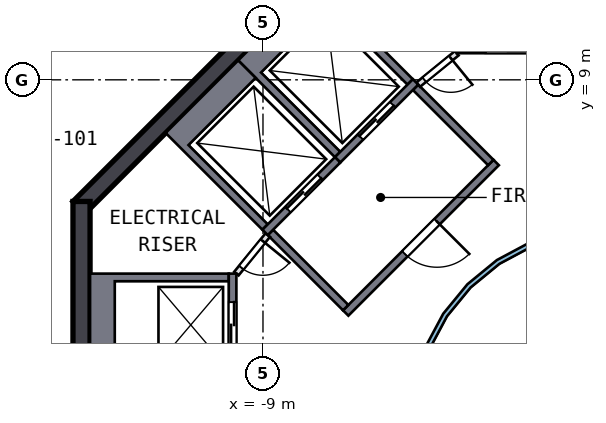
"""IFC4 building model, lengths in metres.
Left out: names, types, materials, properties, quantities, classifications, styles, units other than length and angle.
Written with IfcOpenShell. Run it as: python <this file> out.ifc"""

import sys

from ifc_helpers import new_model, si_unit, direction, frame, frame_2d, origin, place, context, subcontext, project, spatial, polyline, rectangle, outline, extrude, element, fill, save


model = new_model("IFC4")
c1 = context("Model", 3, precision=1e-05, world=origin(), true_north=direction((0.0, 1.0)))
c2 = subcontext(c1, "Body", "Model", "MODEL_VIEW")
j1 = project(units=[si_unit("LENGTHUNIT", "METRE"), si_unit("PLANEANGLEUNIT", "RADIAN")], contexts=[c1])
p1 = place(None, origin())
s1 = spatial("IfcSite", under=j1, at=p1, CompositionType="ELEMENT")
p2 = place(p1, origin())
s2 = spatial("IfcBuilding", under=s1, at=p2, CompositionType="ELEMENT")
p3 = place(p2, frame((0.0, 0.0, 299.5)))
s3 = spatial("IfcBuildingStorey", under=s2, at=p3, CompositionType="ELEMENT", Elevation=299.5)
p4 = place(p3, frame((-5.64, 13.841, 0.0), z_axis=(0.0, 0.0, 1.0), x_axis=(-0.707106781, -0.707106781, 0.0)))
e1 = element("IfcWall", 1, at=p4, inside=s3, PredefinedType="SHEAR", context=c2, shape_type="SweptSolid", body=[
    extrude(rectangle(XDim=11.598, YDim=0.45, at=frame_2d((5.799, 0.0))), origin(), (0.0, 0.0, 1.0), 3.5),
])
p5 = place(p3, frame((-13.775, 5.799, 0.0), z_axis=(0.0, 0.0, 1.0), x_axis=(0.0, -1.0, 0.0)))
e2 = element("IfcWall", 2, at=p5, inside=s3, PredefinedType="SHEAR", context=c2, shape_type="SweptSolid", body=[
    extrude(rectangle(XDim=11.598, YDim=0.45, at=frame_2d((5.799, 0.0))), origin(), (0.0, 0.0, 1.0), 3.5),
])
p6 = place(p5, frame((4.899, 0.0, 0.0)))
e3 = element("IfcOpeningElement", 3, at=p6, cuts=e2, PredefinedType="OPENING", context=c2, shape_type="SweptSolid", body=[
    extrude(rectangle(XDim=1.8, YDim=2.1, at=frame_2d((0.9, 1.05))), frame((0.0, 0.235, 0.0), z_axis=(0.0, -1.0, 0.0), x_axis=(1.0, 0.0, 0.0)), (0.0, 0.0, 1.0), 0.47),
])
p7 = place(p3, frame((-1.2, 9.8, 0.0), z_axis=(0.0, 0.0, 1.0), x_axis=(-1.0, 0.0, 0.0)))
e4 = element("IfcWall", 4, at=p7, inside=s3, PredefinedType="SOLIDWALL", context=c2, shape_type="SweptSolid", body=[
    extrude(rectangle(XDim=2.7, YDim=0.2, at=frame_2d((1.35, 0.0))), origin(), (0.0, 0.0, 1.0), 3.19),
])
p8 = place(p7, frame((0.75, 0.0, 0.0)))
e5 = element("IfcOpeningElement", 5, at=p8, cuts=e4, PredefinedType="OPENING", context=c2, shape_type="SweptSolid", body=[
    extrude(rectangle(XDim=1.2, YDim=2.1, at=frame_2d((0.6, 1.05))), frame((0.0, 0.11, 0.0), z_axis=(0.0, -1.0, 0.0), x_axis=(1.0, 0.0, 0.0)), (0.0, 0.0, 1.0), 0.22),
])
p9 = place(p3, origin())
e6 = element("IfcWall", 6, at=p9, inside=s3, PredefinedType="SOLIDWALL", context=c2, shape_type="SweptSolid", body=[
    extrude(outline(polyline([(-13.55, 3.9), (-9.9, 3.9), (-9.9, 3.7), (-12.9, 3.7), (-12.9, 1.4), (-9.9, 1.4), (-9.9, 1.2), (-13.55, 1.2), (-13.55, 3.9)])), origin(), (0.0, 0.0, 1.0), 3.19),
])
p10 = place(p3, frame((-9.8, 1.2, 0.0), z_axis=(0.0, 0.0, 1.0), x_axis=(0.0, 1.0, 0.0)))
e7 = element("IfcWall", 7, at=p10, inside=s3, PredefinedType="SOLIDWALL", context=c2, shape_type="SweptSolid", body=[
    extrude(rectangle(XDim=2.7, YDim=0.2, at=frame_2d((1.35, 0.0))), origin(), (0.0, 0.0, 1.0), 3.19),
])
p11 = place(p10, frame((0.75, 0.0, 0.0)))
e8 = element("IfcOpeningElement", 8, at=p11, cuts=e7, PredefinedType="OPENING", context=c2, shape_type="SweptSolid", body=[
    extrude(rectangle(XDim=1.2, YDim=2.1, at=frame_2d((0.6, 1.05))), frame((0.0, 0.11, 0.0), z_axis=(0.0, -1.0, 0.0), x_axis=(1.0, 0.0, 0.0)), (0.0, 0.0, 1.0), 0.22),
])
p12 = place(p3, origin())
e9 = element("IfcWall", 9, at=p12, inside=s3, PredefinedType="SOLIDWALL", context=c2, shape_type="SweptSolid", body=[
    extrude(outline(polyline([(-9.652, 9.51), (-7.601, 11.561), (-5.056, 9.016), (-5.197, 8.874), (-7.283, 10.96), (-9.051, 9.192), (-6.965, 7.106), (-7.106, 6.965), (-9.652, 9.51)])), origin(), (0.0, 0.0, 1.0), 3.19),
])
p13 = place(p3, frame((-4.985, 8.945, 0.0), z_axis=(0.0, 0.0, 1.0), x_axis=(-0.707106781, -0.707106781, 0.0)))
e10 = element("IfcWall", 10, at=p13, inside=s3, PredefinedType="SOLIDWALL", context=c2, shape_type="SweptSolid", body=[
    extrude(rectangle(XDim=2.9, YDim=0.2, at=frame_2d((1.45, 0.0))), origin(), (0.0, 0.0, 1.0), 3.19),
])
p14 = place(p13, frame((0.85, 0.0, 0.0)))
e11 = element("IfcOpeningElement", 11, at=p14, cuts=e10, PredefinedType="OPENING", context=c2, shape_type="SweptSolid", body=[
    extrude(rectangle(XDim=1.2, YDim=2.1, at=frame_2d((0.6, 1.05))), frame((0.0, 0.11, 0.0), z_axis=(0.0, -1.0, 0.0), x_axis=(1.0, 0.0, 0.0)), (0.0, 0.0, 1.0), 0.22),
])
p15 = place(p3, origin())
e12 = element("IfcWall", 12, at=p15, inside=s3, PredefinedType="SOLIDWALL", context=c2, shape_type="SweptSolid", body=[
    extrude(outline(polyline([(-11.561, 7.601), (-9.652, 9.51), (-9.192, 9.051), (-10.96, 7.283), (-8.874, 5.197), (-9.016, 5.056), (-11.561, 7.601)])), origin(), (0.0, 0.0, 1.0), 3.19),
])
p16 = place(p3, frame((-7.036, 6.894, 0.0), z_axis=(0.0, 0.0, 1.0), x_axis=(-0.707106781, -0.707106781, 0.0)))
e13 = element("IfcWall", 13, at=p16, inside=s3, PredefinedType="SOLIDWALL", context=c2, shape_type="SweptSolid", body=[
    extrude(rectangle(XDim=2.7, YDim=0.2, at=frame_2d((1.35, 0.0))), origin(), (0.0, 0.0, 1.0), 3.19),
])
p17 = place(p16, frame((0.65, 0.0, 0.0)))
e14 = element("IfcOpeningElement", 14, at=p17, cuts=e13, PredefinedType="OPENING", context=c2, shape_type="SweptSolid", body=[
    extrude(rectangle(XDim=1.2, YDim=2.1, at=frame_2d((0.6, 1.05))), frame((0.0, 0.11, 0.0), z_axis=(0.0, -1.0, 0.0), x_axis=(1.0, 0.0, 0.0)), (0.0, 0.0, 1.0), 0.22),
])
p18 = place(p3, frame((-2.864, 6.823, 0.0), z_axis=(0.0, 0.0, 1.0), x_axis=(-0.707106781, -0.707106781, 0.0)))
e15 = element("IfcWall", 15, at=p18, inside=s3, PredefinedType="SOLIDWALL", context=c2, shape_type="SweptSolid", body=[
    extrude(rectangle(XDim=5.6, YDim=0.2, at=frame_2d((2.8, 0.0))), origin(), (0.0, 0.0, 1.0), 3.19),
])
p19 = place(p18, frame((2.2, 0.0, 0.0)))
e16 = element("IfcOpeningElement", 16, at=p19, cuts=e15, PredefinedType="OPENING", context=c2, shape_type="SweptSolid", body=[
    extrude(rectangle(XDim=1.2, YDim=2.1, at=frame_2d((0.6, 1.05))), frame((0.0, 0.11, 0.0), z_axis=(0.0, -1.0, 0.0), x_axis=(1.0, 0.0, 0.0)), (0.0, 0.0, 1.0), 0.22),
])
for number, where, z_axis, x_axis in (
    (17, (-3.005, 6.823, 0.0), (0.0, 0.0, 1.0), (-0.707, 0.707, 0.0)),
    (18, (-6.823, 3.005, 0.0), (0.0, 0.0, 1.0), (-0.707, 0.707, 0.0)),
):
    element("IfcWall", number, at=place(p3, frame(where, z_axis=z_axis, x_axis=x_axis)), inside=s3, PredefinedType="SOLIDWALL", context=c2, shape_type="SweptSolid", body=[
        extrude(rectangle(XDim=2.8, YDim=0.2, at=frame_2d((1.4, 0.0))), origin(), (0.0, 0.0, 1.0), 3.19),
    ])
p20 = place(p3, frame((-3.9, 9.7, 0.0), z_axis=(0.0, 0.0, 1.0), x_axis=(-0.775559878, -0.631274009, 0.0)))
e19 = element("IfcWall", 19, at=p20, inside=s3, PredefinedType="PARTITIONING", context=c2, shape_type="SweptSolid", body=[
    extrude(rectangle(XDim=1.308, YDim=0.15, at=frame_2d((0.654, 0.0))), origin(), (0.0, 0.0, 1.0), 3.19),
])
p21 = place(p20, frame((0.204, 0.0, 0.0)))
e20 = element("IfcOpeningElement", 20, at=p21, cuts=e19, PredefinedType="OPENING", context=c2, shape_type="SweptSolid", body=[
    extrude(rectangle(XDim=0.9, YDim=2.1, at=frame_2d((0.45, 1.05))), frame((0.0, 0.085, 0.0), z_axis=(0.0, -1.0, 0.0), x_axis=(1.0, 0.0, 0.0)), (0.0, 0.0, 1.0), 0.17),
])
p22 = place(p3, frame((-8.874, 4.914, 0.0), z_axis=(0.0, 0.0, 1.0), x_axis=(-0.631274009, -0.775559878, 0.0)))
e21 = element("IfcWall", 21, at=p22, inside=s3, PredefinedType="PARTITIONING", context=c2, shape_type="SweptSolid", body=[
    extrude(rectangle(XDim=1.308, YDim=0.15, at=frame_2d((0.654, 0.0))), origin(), (0.0, 0.0, 1.0), 3.19),
])
p23 = place(p22, frame((0.204, 0.0, 0.0)))
e22 = element("IfcOpeningElement", 22, at=p23, cuts=e21, PredefinedType="OPENING", context=c2, shape_type="SweptSolid", body=[
    extrude(rectangle(XDim=0.9, YDim=2.1, at=frame_2d((0.45, 1.05))), frame((0.0, 0.085, 0.0), z_axis=(0.0, -1.0, 0.0), x_axis=(1.0, 0.0, 0.0)), (0.0, 0.0, 1.0), 0.17),
])
p24 = place(p3, origin())
e23 = element("IfcWall", 23, at=p24, inside=s3, PredefinedType="SOLIDWALL", context=c2, shape_type="SweptSolid", body=[
    extrude(outline(polyline([(5.021, -0.999), (4.73, -1.959), (4.257, -2.844), (3.62, -3.62), (2.844, -4.257), (1.959, -4.73), (0.999, -5.021), (0.0, -5.12), (-0.999, -5.021), (-1.959, -4.73), (-2.844, -4.257), (-3.62, -3.62), (-4.257, -2.844), (-4.73, -1.959), (-5.021, -0.999), (-5.12, 0.0), (-5.021, 0.999), (-4.73, 1.959), (-4.257, 2.844), (-3.62, 3.62), (-2.844, 4.257), (-1.959, 4.73), (-0.999, 5.021), (0.0, 5.12), (0.999, 5.021), (1.959, 4.73), (2.844, 4.257), (3.62, 3.62), (4.257, 2.844), (4.73, 1.959), (5.021, 0.999), (5.12, 0.0), (5.021, -0.999)]), holes=[polyline([(4.904, 0.976), (4.619, 1.913), (4.157, 2.778), (3.535, 3.535), (2.778, 4.157), (1.913, 4.619), (0.976, 4.904), (0.0, 5.0), (-0.976, 4.904), (-1.913, 4.619), (-2.778, 4.157), (-3.535, 3.535), (-4.157, 2.778), (-4.619, 1.913), (-4.904, 0.976), (-5.0, 0.0), (-4.904, -0.976), (-4.619, -1.913), (-4.157, -2.778), (-3.535, -3.535), (-2.778, -4.157), (-1.913, -4.619), (-0.976, -4.904), (0.0, -5.0), (0.976, -4.904), (1.913, -4.619), (2.778, -4.157), (3.535, -3.535), (4.157, -2.778), (4.619, -1.913), (4.904, -0.976), (5.0, 0.0), (4.904, 0.976)])]), origin(), (0.0, 0.0, 1.0), 3.19),
])
p25 = place(p3, frame((-18.121, 3.104, 0.0), z_axis=(0.0, 0.0, 1.0), x_axis=(0.418187622, 0.908360673, 0.0)))
e24 = element("IfcWall", 24, at=p25, inside=s3, PredefinedType="SOLIDWALL", context=c2, shape_type="SweptSolid", body=[
    extrude(rectangle(XDim=9.517, YDim=0.2, at=frame_2d((4.758, 0.0))), origin(), (0.0, 0.0, 1.0), 3.19),
])
p26 = place(p25, frame((3.835, 0.0, 0.0)))
e25 = element("IfcOpeningElement", 25, at=p26, cuts=e24, PredefinedType="OPENING", context=c2, shape_type="SweptSolid", body=[
    extrude(rectangle(XDim=1.8, YDim=2.1, at=frame_2d((0.9, 1.05))), frame((0.0, 0.11, 0.0), z_axis=(0.0, -1.0, 0.0), x_axis=(1.0, 0.0, 0.0)), (0.0, 0.0, 1.0), 0.22),
])
p27 = place(p11, origin())
e26 = element("IfcDoor", 26, at=p27, inside=s3, OperationType="DOUBLE_DOOR_SLIDING", PredefinedType="DOOR", context=c2, shape_type="SweptSolid", body=[
    extrude(rectangle(XDim=1.2, YDim=2.1, at=frame_2d((0.6, 1.05))), frame((0.0, 0.025, 0.0), z_axis=(0.0, -1.0, 0.0), x_axis=(1.0, 0.0, 0.0)), (0.0, 0.0, 1.0), 0.05),
])
fill(e8, e26)
p28 = place(p14, origin())
e27 = element("IfcDoor", 27, at=p28, inside=s3, OperationType="DOUBLE_DOOR_SLIDING", PredefinedType="DOOR", context=c2, shape_type="SweptSolid", body=[
    extrude(rectangle(XDim=1.2, YDim=2.1, at=frame_2d((0.6, 1.05))), frame((0.0, 0.025, 0.0), z_axis=(0.0, -1.0, 0.0), x_axis=(1.0, 0.0, 0.0)), (0.0, 0.0, 1.0), 0.05),
])
fill(e11, e27)
p29 = place(p17, origin())
e28 = element("IfcDoor", 28, at=p29, inside=s3, OperationType="DOUBLE_DOOR_SLIDING", PredefinedType="DOOR", context=c2, shape_type="SweptSolid", body=[
    extrude(rectangle(XDim=1.2, YDim=2.1, at=frame_2d((0.6, 1.05))), frame((0.0, 0.025, 0.0), z_axis=(0.0, -1.0, 0.0), x_axis=(1.0, 0.0, 0.0)), (0.0, 0.0, 1.0), 0.05),
])
fill(e14, e28)
p30 = place(p19, origin())
e29 = element("IfcDoor", 29, at=p30, inside=s3, OperationType="SINGLE_SWING_LEFT", PredefinedType="DOOR", context=c2, shape_type="SweptSolid", body=[
    extrude(rectangle(XDim=1.2, YDim=2.1, at=frame_2d((0.6, 1.05))), frame((0.0, 0.025, 0.0), z_axis=(0.0, -1.0, 0.0), x_axis=(1.0, 0.0, 0.0)), (0.0, 0.0, 1.0), 0.05),
])
fill(e16, e29)
p31 = place(p21, origin())
e30 = element("IfcDoor", 30, at=p31, inside=s3, OperationType="SINGLE_SWING_LEFT", PredefinedType="DOOR", context=c2, shape_type="SweptSolid", body=[
    extrude(rectangle(XDim=0.9, YDim=2.1, at=frame_2d((0.45, 1.05))), frame((0.0, 0.025, 0.0), z_axis=(0.0, -1.0, 0.0), x_axis=(1.0, 0.0, 0.0)), (0.0, 0.0, 1.0), 0.05),
])
fill(e20, e30)
p32 = place(p23, origin())
e31 = element("IfcDoor", 31, at=p32, inside=s3, OperationType="SINGLE_SWING_LEFT", PredefinedType="DOOR", context=c2, shape_type="SweptSolid", body=[
    extrude(rectangle(XDim=0.9, YDim=2.1, at=frame_2d((0.45, 1.05))), frame((0.0, 0.025, 0.0), z_axis=(0.0, -1.0, 0.0), x_axis=(1.0, 0.0, 0.0)), (0.0, 0.0, 1.0), 0.05),
])
fill(e22, e31)
save(model, sys.argv[1])
